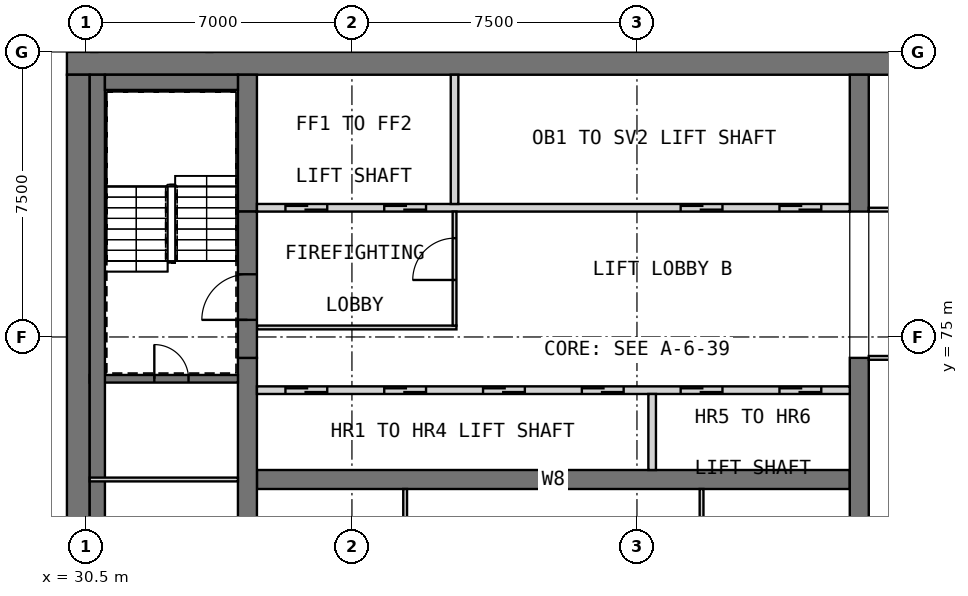
"""IFC4 building model, lengths in metres.
Left out: names, types, materials, properties, quantities, classifications, styles, units other than length and angle.
Written with IfcOpenShell. Run it as: python <this file> out.ifc"""

import sys

from ifc_helpers import new_model, si_unit, direction, frame, frame_2d, origin, place, context, subcontext, project, spatial, rectangle, extrude, element, fill, save


model = new_model("IFC4")
c1 = context("Model", 3, precision=1e-05, world=origin(), true_north=direction((0.0, 1.0)))
c2 = subcontext(c1, "Body", "Model", "MODEL_VIEW")
j1 = project(units=[si_unit("LENGTHUNIT", "METRE"), si_unit("PLANEANGLEUNIT", "RADIAN")], contexts=[c1])
p1 = place(None, origin())
s1 = spatial("IfcSite", under=j1, at=p1, CompositionType="ELEMENT")
p2 = place(p1, origin())
s2 = spatial("IfcBuilding", under=s1, at=p2, CompositionType="ELEMENT")
p3 = place(p2, frame((0.0, 0.0, 297.7)))
s3 = spatial("IfcBuildingStorey", under=s2, at=p3, CompositionType="ELEMENT", Elevation=297.7)
p4 = place(p3, frame((30.0, 82.2, 0.0), z_axis=(0.0, 0.0, 1.0), x_axis=(1.0, 0.0, 0.0)))
e1 = element("IfcWall", 1, at=p4, inside=s3, PredefinedType="SHEAR", context=c2, shape_type="SweptSolid", body=[
    extrude(rectangle(XDim=30.0, YDim=0.6, at=frame_2d((15.0, 0.0))), origin(), (0.0, 0.0, 1.0), 5.0),
])
p5 = place(p3, frame((30.3, 60.6, 0.0), z_axis=(0.0, 0.0, 1.0), x_axis=(0.0, 1.0, 0.0)))
e2 = element("IfcWall", 2, at=p5, inside=s3, PredefinedType="SHEAR", context=c2, shape_type="SweptSolid", body=[
    extrude(rectangle(XDim=21.3, YDim=0.6, at=frame_2d((10.65, 0.0))), origin(), (0.0, 0.0, 1.0), 5.0),
])
p6 = place(p3, frame((35.0, 71.25, 0.0), z_axis=(0.0, 0.0, 1.0), x_axis=(1.0, 0.0, 0.0)))
e3 = element("IfcWall", 3, at=p6, inside=s3, PredefinedType="SHEAR", context=c2, shape_type="SweptSolid", body=[
    extrude(rectangle(XDim=15.6, YDim=0.5, at=frame_2d((7.8, 0.0))), origin(), (0.0, 0.0, 1.0), 5.0),
])
p7 = place(p3, frame((34.75, 68.05, 0.0), z_axis=(0.0, 0.0, 1.0), x_axis=(0.0, 1.0, 0.0)))
e4 = element("IfcWall", 4, at=p7, inside=s3, PredefinedType="SHEAR", context=c2, shape_type="SweptSolid", body=[
    extrude(rectangle(XDim=6.4, YDim=0.5, at=frame_2d((3.2, 0.0))), origin(), (0.0, 0.0, 1.0), 5.0),
])
p8 = place(p3, frame((34.75, 78.3, 0.0), z_axis=(0.0, 0.0, 1.0), x_axis=(0.0, 1.0, 0.0)))
e5 = element("IfcWall", 5, at=p8, inside=s3, PredefinedType="SHEAR", context=c2, shape_type="SweptSolid", body=[
    extrude(rectangle(XDim=3.6, YDim=0.5, at=frame_2d((1.8, 0.0))), origin(), (0.0, 0.0, 1.0), 5.0),
])
p9 = place(p3, frame((50.85, 68.05, 0.0), z_axis=(0.0, 0.0, 1.0), x_axis=(0.0, 1.0, 0.0)))
e6 = element("IfcWall", 6, at=p9, inside=s3, PredefinedType="SHEAR", context=c2, shape_type="SweptSolid", body=[
    extrude(rectangle(XDim=6.4, YDim=0.5, at=frame_2d((3.2, 0.0))), origin(), (0.0, 0.0, 1.0), 5.0),
])
p10 = place(p3, frame((50.85, 78.3, 0.0), z_axis=(0.0, 0.0, 1.0), x_axis=(0.0, 1.0, 0.0)))
e7 = element("IfcWall", 7, at=p10, inside=s3, PredefinedType="SHEAR", context=c2, shape_type="SweptSolid", body=[
    extrude(rectangle(XDim=3.6, YDim=0.5, at=frame_2d((1.8, 0.0))), origin(), (0.0, 0.0, 1.0), 5.0),
])
p11 = place(p2, frame((0.0, 0.0, 34.0)))
s4 = spatial("IfcBuildingStorey", under=s2, at=p11, CompositionType="ELEMENT", Elevation=34.0)
for number, where, z_axis, x_axis in (
    (8, (29.7, 70.8, 0.0), (0.0, 0.0, 1.0), (0.0, 1.0, 0.0)),
    (9, (29.7, 75.675, 0.0), (0.0, 0.0, 1.0), (0.0, 1.0, 0.0)),
    (10, (29.7, 80.55, 0.0), (0.0, 0.0, 1.0), (0.0, 1.0, 0.0)),
):
    element("IfcWall", number, at=place(p11, frame(where, z_axis=z_axis, x_axis=x_axis)), inside=s4, PredefinedType="SOLIDWALL", context=c2, shape_type="SweptSolid", body=[
        extrude(rectangle(XDim=0.9, YDim=0.6, at=frame_2d((0.45, 0.0))), origin(), (0.0, 0.0, 1.0), 286.2),
    ])
for number, where, z_axis, x_axis in (
    (11, (38.9, 68.25, 0.0), (0.0, 0.0, 1.0), (0.0, 1.0, 0.0)),
    (12, (46.7, 68.25, 0.0), (0.0, 0.0, 1.0), (0.0, 1.0, 0.0)),
):
    element("IfcWall", number, at=place(p3, frame(where, z_axis=z_axis, x_axis=x_axis)), inside=s3, PredefinedType="PARTITIONING", context=c2, shape_type="SweptSolid", body=[
        extrude(rectangle(XDim=2.75, YDim=0.1, at=frame_2d((1.375, 0.0))), origin(), (0.0, 0.0, 1.0), 4.7),
    ])
p12 = place(p3, frame((35.0, 73.6, 0.0), z_axis=(0.0, 0.0, 1.0), x_axis=(1.0, 0.0, 0.0)))
e13 = element("IfcWall", 13, at=p12, inside=s3, PredefinedType="SOLIDWALL", context=c2, shape_type="SweptSolid", body=[
    extrude(rectangle(XDim=15.6, YDim=0.2, at=frame_2d((7.8, 0.0))), origin(), (0.0, 0.0, 1.0), 5.0),
])
p13 = place(p12, frame((0.75, 0.0, 0.0)))
e14 = element("IfcOpeningElement", 14, at=p13, cuts=e13, PredefinedType="OPENING", context=c2, shape_type="SweptSolid", body=[
    extrude(rectangle(XDim=1.1, YDim=2.1, at=frame_2d((0.55, 1.05))), frame((0.0, 0.11, 0.0), z_axis=(0.0, -1.0, 0.0), x_axis=(1.0, 0.0, 0.0)), (0.0, 0.0, 1.0), 0.22),
])
p14 = place(p12, frame((3.35, 0.0, 0.0)))
e15 = element("IfcOpeningElement", 15, at=p14, cuts=e13, PredefinedType="OPENING", context=c2, shape_type="SweptSolid", body=[
    extrude(rectangle(XDim=1.1, YDim=2.1, at=frame_2d((0.55, 1.05))), frame((0.0, 0.11, 0.0), z_axis=(0.0, -1.0, 0.0), x_axis=(1.0, 0.0, 0.0)), (0.0, 0.0, 1.0), 0.22),
])
p15 = place(p12, frame((5.95, 0.0, 0.0)))
e16 = element("IfcOpeningElement", 16, at=p15, cuts=e13, PredefinedType="OPENING", context=c2, shape_type="SweptSolid", body=[
    extrude(rectangle(XDim=1.1, YDim=2.1, at=frame_2d((0.55, 1.05))), frame((0.0, 0.11, 0.0), z_axis=(0.0, -1.0, 0.0), x_axis=(1.0, 0.0, 0.0)), (0.0, 0.0, 1.0), 0.22),
])
p16 = place(p12, frame((8.55, 0.0, 0.0)))
e17 = element("IfcOpeningElement", 17, at=p16, cuts=e13, PredefinedType="OPENING", context=c2, shape_type="SweptSolid", body=[
    extrude(rectangle(XDim=1.1, YDim=2.1, at=frame_2d((0.55, 1.05))), frame((0.0, 0.11, 0.0), z_axis=(0.0, -1.0, 0.0), x_axis=(1.0, 0.0, 0.0)), (0.0, 0.0, 1.0), 0.22),
])
p17 = place(p12, frame((11.15, 0.0, 0.0)))
e18 = element("IfcOpeningElement", 18, at=p17, cuts=e13, PredefinedType="OPENING", context=c2, shape_type="SweptSolid", body=[
    extrude(rectangle(XDim=1.1, YDim=2.1, at=frame_2d((0.55, 1.05))), frame((0.0, 0.11, 0.0), z_axis=(0.0, -1.0, 0.0), x_axis=(1.0, 0.0, 0.0)), (0.0, 0.0, 1.0), 0.22),
])
p18 = place(p12, frame((13.75, 0.0, 0.0)))
e19 = element("IfcOpeningElement", 19, at=p18, cuts=e13, PredefinedType="OPENING", context=c2, shape_type="SweptSolid", body=[
    extrude(rectangle(XDim=1.1, YDim=2.1, at=frame_2d((0.55, 1.05))), frame((0.0, 0.11, 0.0), z_axis=(0.0, -1.0, 0.0), x_axis=(1.0, 0.0, 0.0)), (0.0, 0.0, 1.0), 0.22),
])
p19 = place(p3, frame((45.4, 71.5, 0.0), z_axis=(0.0, 0.0, 1.0), x_axis=(0.0, 1.0, 0.0)))
e20 = element("IfcWall", 20, at=p19, inside=s3, PredefinedType="SOLIDWALL", context=c2, shape_type="SweptSolid", body=[
    extrude(rectangle(XDim=2.0, YDim=0.2, at=frame_2d((1.0, 0.0))), origin(), (0.0, 0.0, 1.0), 5.0),
])
p20 = place(p3, frame((35.0, 78.4, 0.0), z_axis=(0.0, 0.0, 1.0), x_axis=(1.0, 0.0, 0.0)))
e21 = element("IfcWall", 21, at=p20, inside=s3, PredefinedType="SOLIDWALL", context=c2, shape_type="SweptSolid", body=[
    extrude(rectangle(XDim=15.6, YDim=0.2, at=frame_2d((7.8, 0.0))), origin(), (0.0, 0.0, 1.0), 5.0),
])
p21 = place(p20, frame((0.75, 0.0, 0.0)))
e22 = element("IfcOpeningElement", 22, at=p21, cuts=e21, PredefinedType="OPENING", context=c2, shape_type="SweptSolid", body=[
    extrude(rectangle(XDim=1.1, YDim=2.1, at=frame_2d((0.55, 1.05))), frame((0.0, 0.11, 0.0), z_axis=(0.0, -1.0, 0.0), x_axis=(1.0, 0.0, 0.0)), (0.0, 0.0, 1.0), 0.22),
])
p22 = place(p20, frame((3.35, 0.0, 0.0)))
e23 = element("IfcOpeningElement", 23, at=p22, cuts=e21, PredefinedType="OPENING", context=c2, shape_type="SweptSolid", body=[
    extrude(rectangle(XDim=1.1, YDim=2.1, at=frame_2d((0.55, 1.05))), frame((0.0, 0.11, 0.0), z_axis=(0.0, -1.0, 0.0), x_axis=(1.0, 0.0, 0.0)), (0.0, 0.0, 1.0), 0.22),
])
p23 = place(p20, frame((11.15, 0.0, 0.0)))
e24 = element("IfcOpeningElement", 24, at=p23, cuts=e21, PredefinedType="OPENING", context=c2, shape_type="SweptSolid", body=[
    extrude(rectangle(XDim=1.1, YDim=2.1, at=frame_2d((0.55, 1.05))), frame((0.0, 0.11, 0.0), z_axis=(0.0, -1.0, 0.0), x_axis=(1.0, 0.0, 0.0)), (0.0, 0.0, 1.0), 0.22),
])
p24 = place(p20, frame((13.75, 0.0, 0.0)))
e25 = element("IfcOpeningElement", 25, at=p24, cuts=e21, PredefinedType="OPENING", context=c2, shape_type="SweptSolid", body=[
    extrude(rectangle(XDim=1.1, YDim=2.1, at=frame_2d((0.55, 1.05))), frame((0.0, 0.11, 0.0), z_axis=(0.0, -1.0, 0.0), x_axis=(1.0, 0.0, 0.0)), (0.0, 0.0, 1.0), 0.22),
])
p25 = place(p3, frame((40.2, 78.5, 0.0), z_axis=(0.0, 0.0, 1.0), x_axis=(0.0, 1.0, 0.0)))
e26 = element("IfcWall", 26, at=p25, inside=s3, PredefinedType="SOLIDWALL", context=c2, shape_type="SweptSolid", body=[
    extrude(rectangle(XDim=3.4, YDim=0.2, at=frame_2d((1.7, 0.0))), origin(), (0.0, 0.0, 1.0), 5.0),
])
p26 = place(p3, frame((35.0, 75.25, 0.0), z_axis=(0.0, 0.0, 1.0), x_axis=(1.0, 0.0, 0.0)))
e27 = element("IfcWall", 27, at=p26, inside=s3, PredefinedType="PARTITIONING", context=c2, shape_type="SweptSolid", body=[
    extrude(rectangle(XDim=5.25, YDim=0.1, at=frame_2d((2.625, 0.0))), origin(), (0.0, 0.0, 1.0), 4.7),
])
p27 = place(p3, frame((40.2, 75.3, 0.0), z_axis=(0.0, 0.0, 1.0), x_axis=(0.0, 1.0, 0.0)))
e28 = element("IfcWall", 28, at=p27, inside=s3, PredefinedType="PARTITIONING", context=c2, shape_type="SweptSolid", body=[
    extrude(rectangle(XDim=3.0, YDim=0.1, at=frame_2d((1.5, 0.0))), origin(), (0.0, 0.0, 1.0), 4.7),
])
p28 = place(p27, frame((1.2, 0.0, 0.0)))
e29 = element("IfcOpeningElement", 29, at=p28, cuts=e28, PredefinedType="OPENING", context=c2, shape_type="SweptSolid", body=[
    extrude(rectangle(XDim=1.1, YDim=2.1, at=frame_2d((0.55, 1.05))), frame((0.0, 0.06, 0.0), z_axis=(0.0, -1.0, 0.0), x_axis=(1.0, 0.0, 0.0)), (0.0, 0.0, 1.0), 0.12),
])
p29 = place(p3, frame((34.75, 74.45, 0.0), z_axis=(0.0, 0.0, 1.0), x_axis=(0.0, 1.0, 0.0)))
e30 = element("IfcWall", 30, at=p29, inside=s3, PredefinedType="SOLIDWALL", context=c2, shape_type="SweptSolid", body=[
    extrude(rectangle(XDim=3.85, YDim=0.5, at=frame_2d((1.925, 0.0))), origin(), (0.0, 0.0, 1.0), 3.8),
])
p30 = place(p29, frame((1.0, 0.0, 0.0)))
e31 = element("IfcOpeningElement", 31, at=p30, cuts=e30, PredefinedType="OPENING", context=c2, shape_type="SweptSolid", body=[
    extrude(rectangle(XDim=1.2, YDim=2.1, at=frame_2d((0.6, 1.05))), frame((0.0, 0.26, 0.0), z_axis=(0.0, -1.0, 0.0), x_axis=(1.0, 0.0, 0.0)), (0.0, 0.0, 1.0), 0.52),
])
p31 = place(p3, frame((30.6, 73.9, 0.0), z_axis=(0.0, 0.0, 1.0), x_axis=(1.0, 0.0, 0.0)))
e32 = element("IfcWall", 32, at=p31, inside=s3, PredefinedType="SOLIDWALL", context=c2, shape_type="SweptSolid", body=[
    extrude(rectangle(XDim=3.9, YDim=0.2, at=frame_2d((1.95, 0.0))), origin(), (0.0, 0.0, 1.0), 4.7),
])
p32 = place(p31, frame((1.7, 0.0, 0.0)))
e33 = element("IfcOpeningElement", 33, at=p32, cuts=e32, PredefinedType="OPENING", context=c2, shape_type="SweptSolid", body=[
    extrude(rectangle(XDim=0.9, YDim=2.1, at=frame_2d((0.45, 1.05))), frame((0.0, 0.11, 0.0), z_axis=(0.0, -1.0, 0.0), x_axis=(1.0, 0.0, 0.0)), (0.0, 0.0, 1.0), 0.22),
])
p33 = place(p3, frame((30.8, 60.6, 0.0), z_axis=(0.0, 0.0, 1.0), x_axis=(0.0, 1.0, 0.0)))
e34 = element("IfcWall", 34, at=p33, inside=s3, PredefinedType="SOLIDWALL", context=c2, shape_type="SweptSolid", body=[
    extrude(rectangle(XDim=21.3, YDim=0.4, at=frame_2d((10.65, 0.0))), origin(), (0.0, 0.0, 1.0), 4.7),
])
p34 = place(p3, frame((31.0, 81.7, 0.0), z_axis=(0.0, 0.0, 1.0), x_axis=(1.0, 0.0, 0.0)))
e35 = element("IfcWall", 35, at=p34, inside=s3, PredefinedType="SOLIDWALL", context=c2, shape_type="SweptSolid", body=[
    extrude(rectangle(XDim=3.5, YDim=0.4, at=frame_2d((1.75, 0.0))), origin(), (0.0, 0.0, 1.0), 4.7),
])
p35 = place(p3, frame((30.6, 71.25, 0.0), z_axis=(0.0, 0.0, 1.0), x_axis=(1.0, 0.0, 0.0)))
e36 = element("IfcWall", 36, at=p35, inside=s3, PredefinedType="PARTITIONING", context=c2, shape_type="SweptSolid", body=[
    extrude(rectangle(XDim=3.9, YDim=0.1, at=frame_2d((1.95, 0.0))), origin(), (0.0, 0.0, 1.0), 4.7),
])
p36 = place(p3, frame((51.1, 74.45, 0.0), z_axis=(0.0, 0.0, 1.0), x_axis=(1.0, 0.0, 0.0)))
e37 = element("IfcWall", 37, at=p36, inside=s3, PredefinedType="PARTITIONING", context=c2, shape_type="SweptSolid", body=[
    extrude(rectangle(XDim=8.3, YDim=0.1, at=frame_2d((4.15, 0.0))), origin(), (0.0, 0.0, 1.0), 4.7),
])
p37 = place(p36, frame((3.7, 0.0, 0.0)))
e38 = element("IfcOpeningElement", 38, at=p37, cuts=e37, PredefinedType="OPENING", context=c2, shape_type="SweptSolid", body=[
    extrude(rectangle(XDim=0.9, YDim=2.1, at=frame_2d((0.45, 1.05))), frame((0.0, 0.06, 0.0), z_axis=(0.0, -1.0, 0.0), x_axis=(1.0, 0.0, 0.0)), (0.0, 0.0, 1.0), 0.12),
])
p38 = place(p3, frame((51.1, 78.35, 0.0), z_axis=(0.0, 0.0, 1.0), x_axis=(1.0, 0.0, 0.0)))
e39 = element("IfcWall", 39, at=p38, inside=s3, PredefinedType="PARTITIONING", context=c2, shape_type="SweptSolid", body=[
    extrude(rectangle(XDim=8.3, YDim=0.1, at=frame_2d((4.15, 0.0))), origin(), (0.0, 0.0, 1.0), 4.7),
])
p39 = place(p38, frame((3.7, 0.0, 0.0)))
e40 = element("IfcOpeningElement", 40, at=p39, cuts=e39, PredefinedType="OPENING", context=c2, shape_type="SweptSolid", body=[
    extrude(rectangle(XDim=0.9, YDim=2.1, at=frame_2d((0.45, 1.05))), frame((0.0, 0.06, 0.0), z_axis=(0.0, -1.0, 0.0), x_axis=(1.0, 0.0, 0.0)), (0.0, 0.0, 1.0), 0.12),
])
p40 = place(p13, origin())
e41 = element("IfcDoor", 41, at=p40, inside=s3, OperationType="DOUBLE_DOOR_SLIDING", PredefinedType="DOOR", context=c2, shape_type="SweptSolid", body=[
    extrude(rectangle(XDim=1.1, YDim=2.1, at=frame_2d((0.55, 1.05))), frame((0.0, 0.025, 0.0), z_axis=(0.0, -1.0, 0.0), x_axis=(1.0, 0.0, 0.0)), (0.0, 0.0, 1.0), 0.05),
])
fill(e14, e41)
p41 = place(p14, origin())
e42 = element("IfcDoor", 42, at=p41, inside=s3, OperationType="DOUBLE_DOOR_SLIDING", PredefinedType="DOOR", context=c2, shape_type="SweptSolid", body=[
    extrude(rectangle(XDim=1.1, YDim=2.1, at=frame_2d((0.55, 1.05))), frame((0.0, 0.025, 0.0), z_axis=(0.0, -1.0, 0.0), x_axis=(1.0, 0.0, 0.0)), (0.0, 0.0, 1.0), 0.05),
])
fill(e15, e42)
p42 = place(p15, origin())
e43 = element("IfcDoor", 43, at=p42, inside=s3, OperationType="DOUBLE_DOOR_SLIDING", PredefinedType="DOOR", context=c2, shape_type="SweptSolid", body=[
    extrude(rectangle(XDim=1.1, YDim=2.1, at=frame_2d((0.55, 1.05))), frame((0.0, 0.025, 0.0), z_axis=(0.0, -1.0, 0.0), x_axis=(1.0, 0.0, 0.0)), (0.0, 0.0, 1.0), 0.05),
])
fill(e16, e43)
p43 = place(p16, origin())
e44 = element("IfcDoor", 44, at=p43, inside=s3, OperationType="DOUBLE_DOOR_SLIDING", PredefinedType="DOOR", context=c2, shape_type="SweptSolid", body=[
    extrude(rectangle(XDim=1.1, YDim=2.1, at=frame_2d((0.55, 1.05))), frame((0.0, 0.025, 0.0), z_axis=(0.0, -1.0, 0.0), x_axis=(1.0, 0.0, 0.0)), (0.0, 0.0, 1.0), 0.05),
])
fill(e17, e44)
p44 = place(p17, origin())
e45 = element("IfcDoor", 45, at=p44, inside=s3, OperationType="DOUBLE_DOOR_SLIDING", PredefinedType="DOOR", context=c2, shape_type="SweptSolid", body=[
    extrude(rectangle(XDim=1.1, YDim=2.1, at=frame_2d((0.55, 1.05))), frame((0.0, 0.025, 0.0), z_axis=(0.0, -1.0, 0.0), x_axis=(1.0, 0.0, 0.0)), (0.0, 0.0, 1.0), 0.05),
])
fill(e18, e45)
p45 = place(p18, origin())
e46 = element("IfcDoor", 46, at=p45, inside=s3, OperationType="DOUBLE_DOOR_SLIDING", PredefinedType="DOOR", context=c2, shape_type="SweptSolid", body=[
    extrude(rectangle(XDim=1.1, YDim=2.1, at=frame_2d((0.55, 1.05))), frame((0.0, 0.025, 0.0), z_axis=(0.0, -1.0, 0.0), x_axis=(1.0, 0.0, 0.0)), (0.0, 0.0, 1.0), 0.05),
])
fill(e19, e46)
p46 = place(p21, origin())
e47 = element("IfcDoor", 47, at=p46, inside=s3, OperationType="DOUBLE_DOOR_SLIDING", PredefinedType="DOOR", context=c2, shape_type="SweptSolid", body=[
    extrude(rectangle(XDim=1.1, YDim=2.1, at=frame_2d((0.55, 1.05))), frame((0.0, 0.025, 0.0), z_axis=(0.0, -1.0, 0.0), x_axis=(1.0, 0.0, 0.0)), (0.0, 0.0, 1.0), 0.05),
])
fill(e22, e47)
p47 = place(p22, origin())
e48 = element("IfcDoor", 48, at=p47, inside=s3, OperationType="DOUBLE_DOOR_SLIDING", PredefinedType="DOOR", context=c2, shape_type="SweptSolid", body=[
    extrude(rectangle(XDim=1.1, YDim=2.1, at=frame_2d((0.55, 1.05))), frame((0.0, 0.025, 0.0), z_axis=(0.0, -1.0, 0.0), x_axis=(1.0, 0.0, 0.0)), (0.0, 0.0, 1.0), 0.05),
])
fill(e23, e48)
p48 = place(p23, origin())
e49 = element("IfcDoor", 49, at=p48, inside=s3, OperationType="DOUBLE_DOOR_SLIDING", PredefinedType="DOOR", context=c2, shape_type="SweptSolid", body=[
    extrude(rectangle(XDim=1.1, YDim=2.1, at=frame_2d((0.55, 1.05))), frame((0.0, 0.025, 0.0), z_axis=(0.0, -1.0, 0.0), x_axis=(1.0, 0.0, 0.0)), (0.0, 0.0, 1.0), 0.05),
])
fill(e24, e49)
p49 = place(p24, origin())
e50 = element("IfcDoor", 50, at=p49, inside=s3, OperationType="DOUBLE_DOOR_SLIDING", PredefinedType="DOOR", context=c2, shape_type="SweptSolid", body=[
    extrude(rectangle(XDim=1.1, YDim=2.1, at=frame_2d((0.55, 1.05))), frame((0.0, 0.025, 0.0), z_axis=(0.0, -1.0, 0.0), x_axis=(1.0, 0.0, 0.0)), (0.0, 0.0, 1.0), 0.05),
])
fill(e25, e50)
p50 = place(p28, origin())
e51 = element("IfcDoor", 51, at=p50, inside=s3, OperationType="SINGLE_SWING_LEFT", PredefinedType="DOOR", context=c2, shape_type="SweptSolid", body=[
    extrude(rectangle(XDim=1.1, YDim=2.1, at=frame_2d((0.55, 1.05))), frame((0.0, 0.025, 0.0), z_axis=(0.0, -1.0, 0.0), x_axis=(1.0, 0.0, 0.0)), (0.0, 0.0, 1.0), 0.05),
])
fill(e29, e51)
p51 = place(p30, origin())
e52 = element("IfcDoor", 52, at=p51, inside=s3, OperationType="SINGLE_SWING_RIGHT", PredefinedType="DOOR", context=c2, shape_type="SweptSolid", body=[
    extrude(rectangle(XDim=1.2, YDim=2.1, at=frame_2d((0.6, 1.05))), frame((0.0, 0.025, 0.0), z_axis=(0.0, -1.0, 0.0), x_axis=(1.0, 0.0, 0.0)), (0.0, 0.0, 1.0), 0.05),
])
fill(e31, e52)
p52 = place(p32, origin())
e53 = element("IfcDoor", 53, at=p52, inside=s3, OperationType="SINGLE_SWING_RIGHT", PredefinedType="DOOR", context=c2, shape_type="SweptSolid", body=[
    extrude(rectangle(XDim=0.9, YDim=2.1, at=frame_2d((0.45, 1.05))), frame((0.0, 0.025, 0.0), z_axis=(0.0, -1.0, 0.0), x_axis=(1.0, 0.0, 0.0)), (0.0, 0.0, 1.0), 0.05),
])
fill(e33, e53)
save(model, sys.argv[1])
